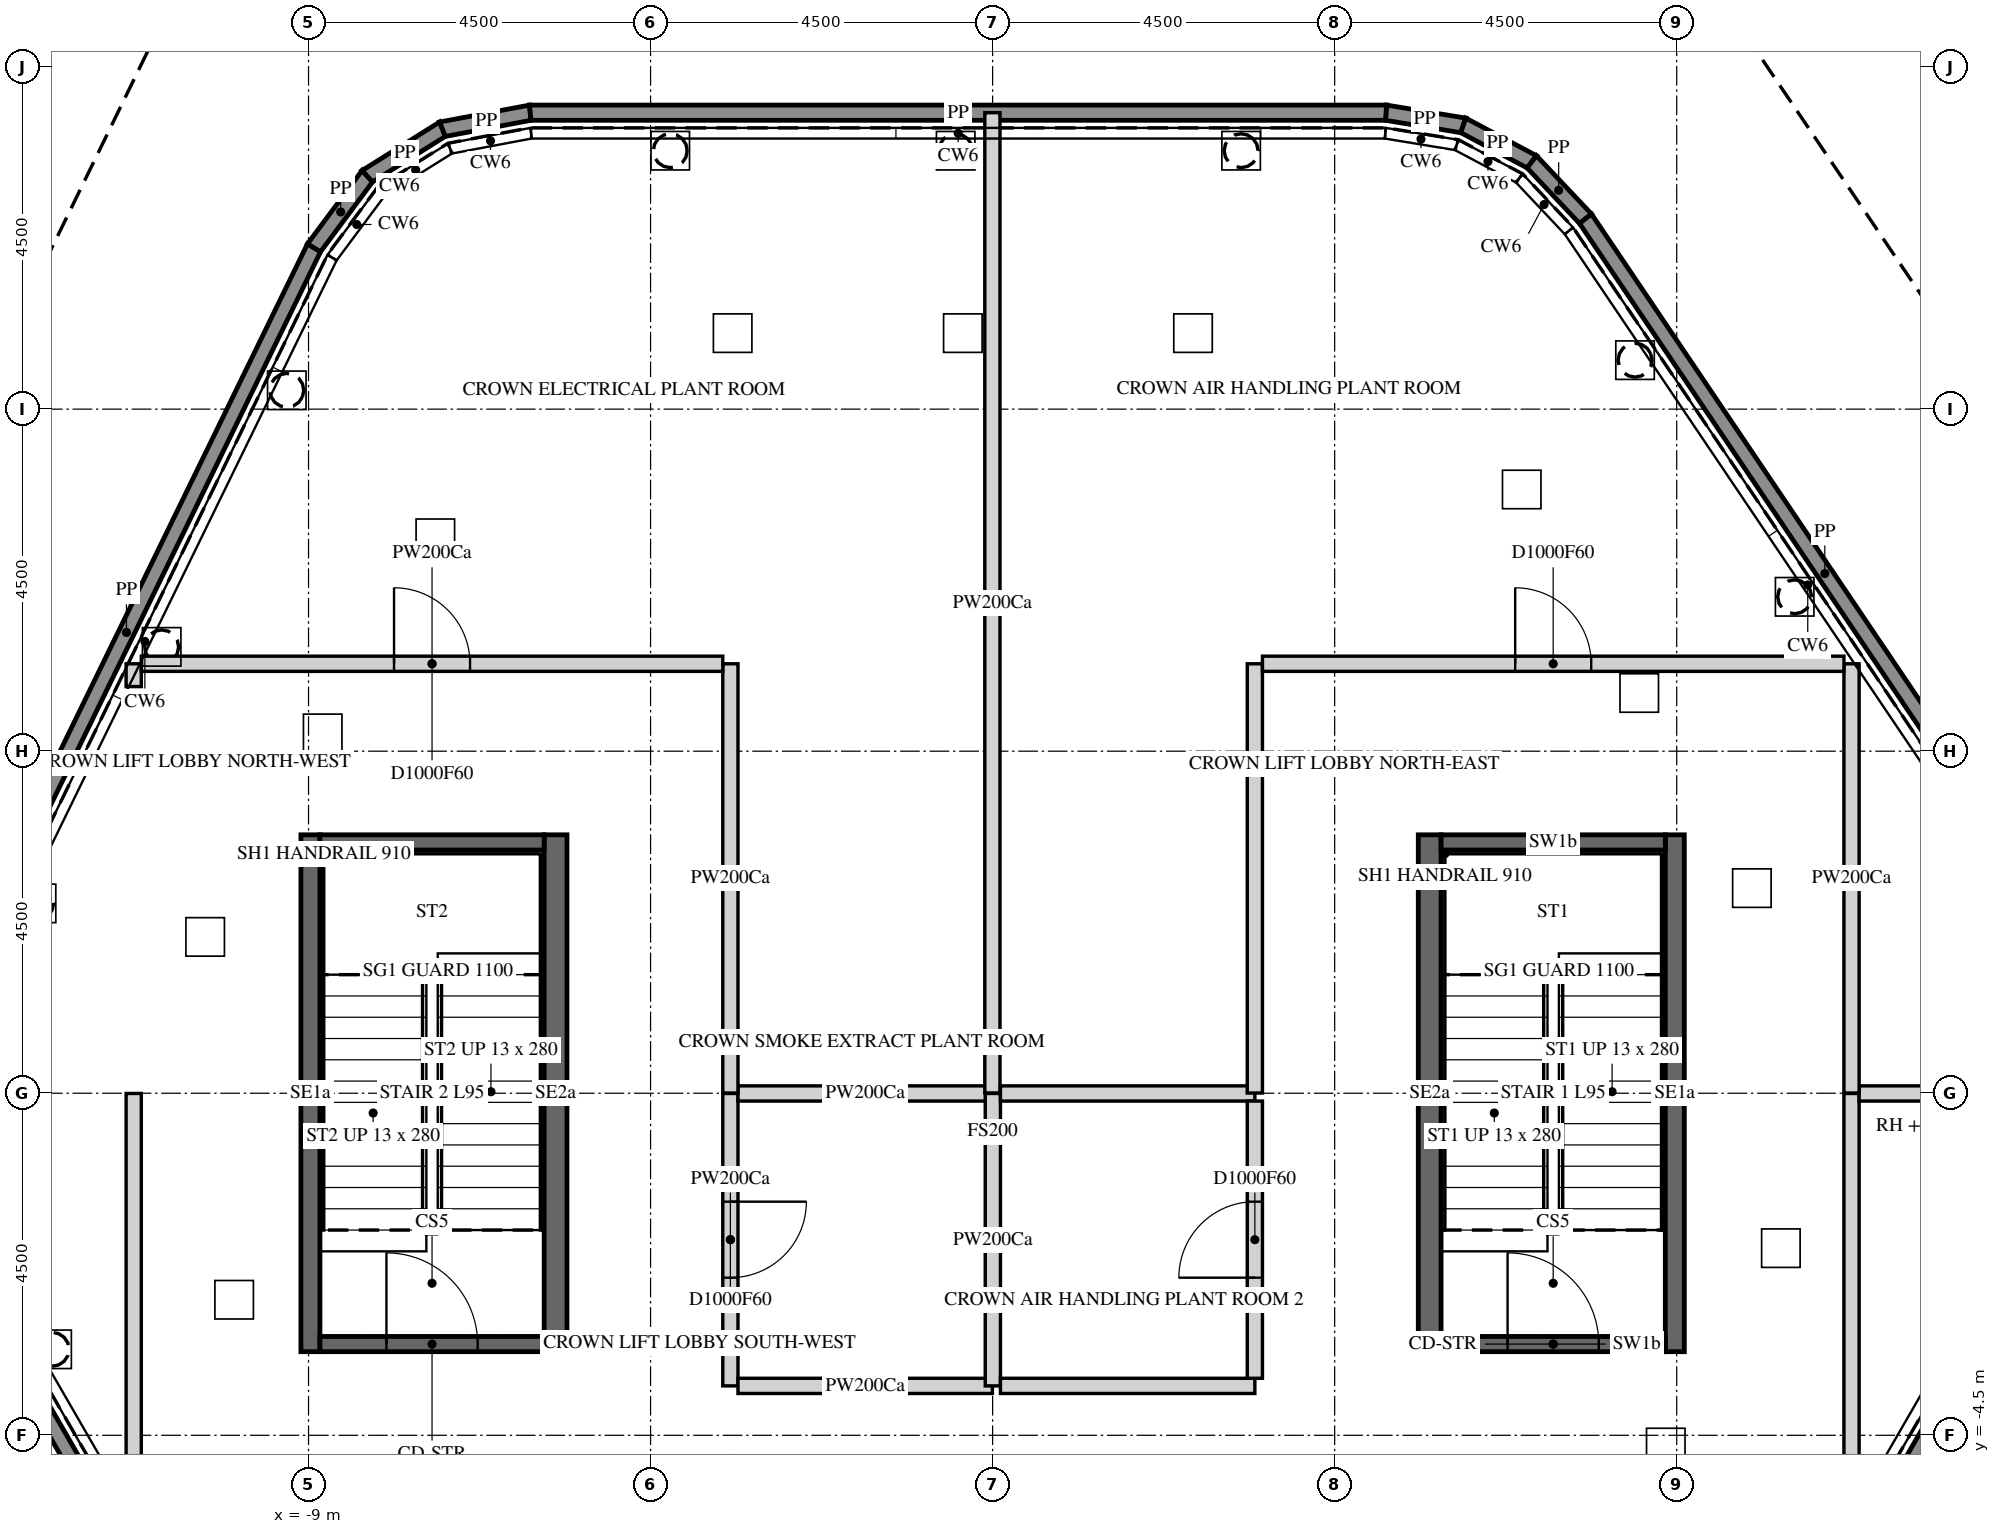
"""IFC4 building model, lengths in metres.
Left out: names, types, materials, properties, quantities, classifications, styles, units other than length and angle.
Written with IfcOpenShell. Run it as: python <this file> out.ifc"""

import sys

from ifc_helpers import new_model, si_unit, direction, frame, frame_2d, origin, place, context, subcontext, project, spatial, polyline, rectangle, outline, extrude, element, fill, save


model = new_model("IFC4")
c1 = context("Model", 3, precision=1e-05, world=origin(), true_north=direction((0.0, 1.0)))
c2 = subcontext(c1, "Body", "Model", "MODEL_VIEW")
j1 = project(units=[si_unit("LENGTHUNIT", "METRE"), si_unit("PLANEANGLEUNIT", "RADIAN")], contexts=[c1])
p1 = place(None, origin())
s1 = spatial("IfcSite", under=j1, at=p1, CompositionType="ELEMENT")
p2 = place(p1, origin())
s2 = spatial("IfcBuilding", under=s1, at=p2, CompositionType="ELEMENT")
p3 = place(p2, frame((0.0, 0.0, 401.7)))
s3 = spatial("IfcBuildingStorey", under=s2, at=p3, CompositionType="ELEMENT", Elevation=401.7)
p4 = place(p3, frame((5.176, 12.9, 4.5), z_axis=(0.0, 0.0, 1.0), x_axis=(0.986756818481, -0.162206600298, 0.0)))
e1 = element("IfcWall", 1, at=p4, inside=s3, PredefinedType="PARAPET", context=c2, shape_type="SweptSolid", body=[
    extrude(outline(polyline([(0.008, -0.1), (1.013, -0.1), (1.046, 0.1), (-0.008, 0.1), (0.008, -0.1)])), origin(), (0.0, 0.0, 1.0), 1.1),
])
p5 = place(p3, frame((6.192, 12.733, 4.5), z_axis=(0.0, 0.0, 1.0), x_axis=(0.883060001067, -0.469260092608, 0.0)))
e2 = element("IfcWall", 2, at=p5, inside=s3, PredefinedType="PARAPET", context=c2, shape_type="SweptSolid", body=[
    extrude(outline(polyline([(0.016, -0.1), (1.005, -0.1), (1.038, 0.1), (-0.016, 0.1), (0.016, -0.1)])), origin(), (0.0, 0.0, 1.0), 1.1),
])
p6 = place(p3, frame((7.094, 12.254, 4.5), z_axis=(0.0, 0.0, 1.0), x_axis=(0.686177819421, -0.727433845882, 0.0)))
e3 = element("IfcWall", 3, at=p6, inside=s3, PredefinedType="PARAPET", context=c2, shape_type="SweptSolid", body=[
    extrude(outline(polyline([(0.016, -0.1), (1.022, -0.1), (1.038, 0.1), (-0.016, 0.1), (0.016, -0.1)])), origin(), (0.0, 0.0, 1.0), 1.1),
])
p7 = place(p3, frame((7.8, 11.505, 4.5), z_axis=(0.0, 0.0, 1.0), x_axis=(0.559185688325, -0.829042439186, 0.0)))
e4 = element("IfcWall", 4, at=p7, inside=s3, PredefinedType="PARAPET", context=c2, shape_type="SweptSolid", body=[
    extrude(outline(polyline([(0.008, -0.1), (11.25, -0.1), (11.268, 0.1), (-0.008, 0.1), (0.008, -0.1)])), origin(), (0.0, 0.0, 1.0), 1.1),
])
for number, where, z_axis, x_axis in (
    (5, (14.213, -1.182, 4.5), (0.0, 0.0, 1.0), (-0.5, -0.866, 0.0)),
    (6, (-8.13, -11.718, 4.5), (0.0, 0.0, 1.0), (-0.5, 0.866, 0.0)),
):
    element("IfcWall", number, at=place(p3, frame(where, z_axis=z_axis, x_axis=x_axis)), inside=s3, PredefinedType="PARAPET", context=c2, shape_type="SweptSolid", body=[
        extrude(outline(polyline([(0.009, -0.1), (11.251, -0.1), (11.267, 0.1), (-0.009, 0.1), (0.009, -0.1)])), origin(), (0.0, 0.0, 1.0), 1.1),
    ])
p8 = place(p3, frame((-13.864, 1.003, 4.5), z_axis=(0.0, 0.0, 1.0), x_axis=(0.438379628459, 0.898789909463, 0.0)))
e7 = element("IfcWall", 7, at=p8, inside=s3, PredefinedType="PARAPET", context=c2, shape_type="SweptSolid", body=[
    extrude(outline(polyline([(0.008, -0.1), (11.25, -0.1), (11.269, 0.1), (-0.008, 0.1), (0.008, -0.1)])), origin(), (0.0, 0.0, 1.0), 1.1),
])
p9 = place(p3, frame((-8.928, 11.123, 4.5), z_axis=(0.0, 0.0, 1.0), x_axis=(0.597203575661, 0.802089701479, 0.0)))
e8 = element("IfcWall", 8, at=p9, inside=s3, PredefinedType="PARAPET", context=c2, shape_type="SweptSolid", body=[
    extrude(outline(polyline([(0.009, -0.1), (1.156, -0.1), (1.194, 0.1), (-0.009, 0.1), (0.009, -0.1)])), origin(), (0.0, 0.0, 1.0), 1.1),
])
p10 = place(p3, frame((-8.226, 12.065, 4.5), z_axis=(0.0, 0.0, 1.0), x_axis=(0.847998304005, 0.529998940003, 0.0)))
e9 = element("IfcWall", 9, at=p10, inside=s3, PredefinedType="PARAPET", context=c2, shape_type="SweptSolid", body=[
    extrude(outline(polyline([(0.019, -0.1), (1.147, -0.1), (1.184, 0.1), (-0.019, 0.1), (0.019, -0.1)])), origin(), (0.0, 0.0, 1.0), 1.1),
])
p11 = place(p3, frame((-7.238, 12.683, 4.5), z_axis=(0.0, 0.0, 1.0), x_axis=(0.982747274219, 0.184953494196, 0.0)))
e10 = element("IfcWall", 10, at=p11, inside=s3, PredefinedType="PARAPET", context=c2, shape_type="SweptSolid", body=[
    extrude(outline(polyline([(0.019, -0.1), (1.166, -0.1), (1.184, 0.1), (-0.019, 0.1), (0.019, -0.1)])), origin(), (0.0, 0.0, 1.0), 1.1),
])
p12 = place(p3, frame((-6.083, 12.9, 4.5), z_axis=(0.0, 0.0, 1.0), x_axis=(1.0, 0.0, 0.0)))
e11 = element("IfcWall", 11, at=p12, inside=s3, PredefinedType="PARAPET", context=c2, shape_type="SweptSolid", body=[
    extrude(outline(polyline([(0.009, -0.1), (11.251, -0.1), (11.267, 0.1), (-0.009, 0.1), (0.009, -0.1)])), origin(), (0.0, 0.0, 1.0), 1.1),
])
p13 = place(p3, frame((5.75, -3.4, -0.2), z_axis=(0.0, 0.0, 1.0), x_axis=(0.0, 1.0, 0.0)))
e12 = element("IfcWall", 12, at=p13, inside=s3, PredefinedType="SHEAR", context=c2, shape_type="SweptSolid", body=[
    extrude(rectangle(XDim=6.8, YDim=0.3, at=frame_2d((3.4, 0.0))), origin(), (0.0, 0.0, 1.0), 4.5),
])
p14 = place(p3, frame((8.975, -3.4, -0.2), z_axis=(0.0, 0.0, 1.0), x_axis=(0.0, 1.0, 0.0)))
e13 = element("IfcWall", 13, at=p14, inside=s3, PredefinedType="SHEAR", context=c2, shape_type="SweptSolid", body=[
    extrude(rectangle(XDim=6.8, YDim=0.25, at=frame_2d((3.4, 0.0))), origin(), (0.0, 0.0, 1.0), 4.5),
])
p15 = place(p3, frame((5.9, 3.3, -0.2), z_axis=(0.0, 0.0, 1.0), x_axis=(1.0, 0.0, 0.0)))
e14 = element("IfcWall", 14, at=p15, inside=s3, PredefinedType="SHEAR", context=c2, shape_type="SweptSolid", body=[
    extrude(rectangle(XDim=2.95, YDim=0.2, at=frame_2d((1.475, 0.0))), origin(), (0.0, 0.0, 1.0), 4.5),
])
p16 = place(p3, frame((5.9, -3.3, -0.2), z_axis=(0.0, 0.0, 1.0), x_axis=(1.0, 0.0, 0.0)))
e15 = element("IfcWall", 15, at=p16, inside=s3, PredefinedType="SHEAR", context=c2, shape_type="SweptSolid", body=[
    extrude(rectangle(XDim=2.95, YDim=0.2, at=frame_2d((1.475, 0.0))), origin(), (0.0, 0.0, 1.0), 4.5),
])
p17 = place(p16, frame((0.875, 0.0, 0.2)))
e16 = element("IfcOpeningElement", 16, at=p17, cuts=e15, PredefinedType="OPENING", context=c2, shape_type="SweptSolid", body=[
    extrude(rectangle(XDim=1.2, YDim=2.4, at=frame_2d((0.6, 1.2))), frame((0.0, 0.11, 0.0), z_axis=(0.0, -1.0, 0.0), x_axis=(1.0, 0.0, 0.0)), (0.0, 0.0, 1.0), 0.22),
])
p18 = place(p3, frame((-5.75, -3.4, -0.2), z_axis=(0.0, 0.0, 1.0), x_axis=(0.0, 1.0, 0.0)))
e17 = element("IfcWall", 17, at=p18, inside=s3, PredefinedType="SHEAR", context=c2, shape_type="SweptSolid", body=[
    extrude(rectangle(XDim=6.8, YDim=0.3, at=frame_2d((3.4, 0.0))), origin(), (0.0, 0.0, 1.0), 4.5),
])
p19 = place(p3, frame((-8.975, -3.4, -0.2), z_axis=(0.0, 0.0, 1.0), x_axis=(0.0, 1.0, 0.0)))
e18 = element("IfcWall", 18, at=p19, inside=s3, PredefinedType="SHEAR", context=c2, shape_type="SweptSolid", body=[
    extrude(rectangle(XDim=6.8, YDim=0.25, at=frame_2d((3.4, 0.0))), origin(), (0.0, 0.0, 1.0), 4.5),
])
p20 = place(p3, frame((-8.85, 3.3, -0.2), z_axis=(0.0, 0.0, 1.0), x_axis=(1.0, 0.0, 0.0)))
e19 = element("IfcWall", 19, at=p20, inside=s3, PredefinedType="SHEAR", context=c2, shape_type="SweptSolid", body=[
    extrude(rectangle(XDim=2.95, YDim=0.2, at=frame_2d((1.475, 0.0))), origin(), (0.0, 0.0, 1.0), 4.5),
])
p21 = place(p3, frame((-8.85, -3.3, -0.2), z_axis=(0.0, 0.0, 1.0), x_axis=(1.0, 0.0, 0.0)))
e20 = element("IfcWall", 20, at=p21, inside=s3, PredefinedType="SHEAR", context=c2, shape_type="SweptSolid", body=[
    extrude(rectangle(XDim=2.95, YDim=0.2, at=frame_2d((1.475, 0.0))), origin(), (0.0, 0.0, 1.0), 4.5),
])
p22 = place(p21, frame((0.875, 0.0, 0.2)))
e21 = element("IfcOpeningElement", 21, at=p22, cuts=e20, PredefinedType="OPENING", context=c2, shape_type="SweptSolid", body=[
    extrude(rectangle(XDim=1.2, YDim=2.4, at=frame_2d((0.6, 1.2))), frame((0.0, 0.11, 0.0), z_axis=(0.0, -1.0, 0.0), x_axis=(1.0, 0.0, 0.0)), (0.0, 0.0, 1.0), 0.22),
])
p23 = place(p3, frame((-11.3, -0.003, 0.0), z_axis=(0.0, 0.0, 1.0), x_axis=(0.0, -1.0, 0.0)))
e22 = element("IfcWall", 22, at=p23, inside=s3, PredefinedType="PARTITIONING", context=c2, shape_type="SweptSolid", body=[
    extrude(rectangle(XDim=5.547, YDim=0.2, at=frame_2d((2.773, 0.0))), origin(), (0.0, 0.0, 1.0), 4.3),
])
p24 = place(p3, frame((-11.3, 5.65, 0.0), z_axis=(0.0, 0.0, 1.0), x_axis=(0.0, -1.0, 0.0)))
e23 = element("IfcWall", 23, at=p24, inside=s3, PredefinedType="PARTITIONING", context=c2, shape_type="SweptSolid", body=[
    extrude(rectangle(XDim=0.3, YDim=0.2, at=frame_2d((0.15, 0.0))), origin(), (0.0, 0.0, 1.0), 4.3),
])
p25 = place(p3, frame((-3.45, -0.003, 0.0), z_axis=(0.0, 0.0, 1.0), x_axis=(0.0, -1.0, 0.0)))
e24 = element("IfcWall", 24, at=p25, inside=s3, PredefinedType="PARTITIONING", context=c2, shape_type="SweptSolid", body=[
    extrude(rectangle(XDim=3.847, YDim=0.2, at=frame_2d((1.924, 0.0))), origin(), (0.0, 0.0, 1.0), 4.3),
])
p26 = place(p25, frame((1.424, 0.0, 0.0)))
e25 = element("IfcOpeningElement", 25, at=p26, cuts=e24, PredefinedType="OPENING", context=c2, shape_type="SweptSolid", body=[
    extrude(rectangle(XDim=1.0, YDim=2.1, at=frame_2d((0.5, 1.05))), frame((0.0, 0.11, 0.0), z_axis=(0.0, -1.0, 0.0), x_axis=(1.0, 0.0, 0.0)), (0.0, 0.0, 1.0), 0.22),
])
p27 = place(p3, frame((-3.35, -0.003, 0.0), z_axis=(0.0, 0.0, 1.0), x_axis=(1.0, 0.0, 0.0)))
e26 = element("IfcWall", 26, at=p27, inside=s3, PredefinedType="PARTITIONING", context=c2, shape_type="SweptSolid", body=[
    extrude(rectangle(XDim=3.347, YDim=0.2, at=frame_2d((1.674, 0.0))), origin(), (0.0, 0.0, 1.0), 4.3),
])
p28 = place(p3, frame((-3.45, 0.003, 0.0), z_axis=(0.0, 0.0, 1.0), x_axis=(0.0, 1.0, 0.0)))
e27 = element("IfcWall", 27, at=p28, inside=s3, PredefinedType="PARTITIONING", context=c2, shape_type="SweptSolid", body=[
    extrude(rectangle(XDim=5.647, YDim=0.2, at=frame_2d((2.823, 0.0))), origin(), (0.0, 0.0, 1.0), 4.3),
])
p29 = place(p3, frame((-11.2, 5.65, 0.0), z_axis=(0.0, 0.0, 1.0), x_axis=(1.0, 0.0, 0.0)))
e28 = element("IfcWall", 28, at=p29, inside=s3, PredefinedType="PARTITIONING", context=c2, shape_type="SweptSolid", body=[
    extrude(rectangle(XDim=7.65, YDim=0.2, at=frame_2d((3.825, 0.0))), origin(), (0.0, 0.0, 1.0), 4.3),
])
p30 = place(p29, frame((3.325, 0.0, 0.0)))
e29 = element("IfcOpeningElement", 29, at=p30, cuts=e28, PredefinedType="OPENING", context=c2, shape_type="SweptSolid", body=[
    extrude(rectangle(XDim=1.0, YDim=2.1, at=frame_2d((0.5, 1.05))), frame((0.0, 0.11, 0.0), z_axis=(0.0, -1.0, 0.0), x_axis=(1.0, 0.0, 0.0)), (0.0, 0.0, 1.0), 0.22),
])
p31 = place(p3, frame((-0.003, -3.85, 0.0), z_axis=(0.0, 0.0, 1.0), x_axis=(-1.0, 0.0, 0.0)))
e30 = element("IfcWall", 30, at=p31, inside=s3, PredefinedType="PARTITIONING", context=c2, shape_type="SweptSolid", body=[
    extrude(rectangle(XDim=3.347, YDim=0.2, at=frame_2d((1.674, 0.0))), origin(), (0.0, 0.0, 1.0), 4.3),
])
p32 = place(p3, frame((-0.003, 12.9, 0.0), z_axis=(0.0, 0.0, 1.0), x_axis=(0.0, -1.0, 0.0)))
e31 = element("IfcWall", 31, at=p32, inside=s3, PredefinedType="PARTITIONING", context=c2, shape_type="SweptSolid", body=[
    extrude(rectangle(XDim=12.897, YDim=0.2, at=frame_2d((6.448, 0.0))), origin(), (0.0, 0.0, 1.0), 4.3),
])
p33 = place(p3, frame((0.003, -3.85, 0.0), z_axis=(0.0, 0.0, 1.0), x_axis=(0.0, 1.0, 0.0)))
e32 = element("IfcWall", 32, at=p33, inside=s3, PredefinedType="PARTITIONING", context=c2, shape_type="SweptSolid", body=[
    extrude(rectangle(XDim=3.847, YDim=0.2, at=frame_2d((1.924, 0.0))), origin(), (0.0, 0.0, 1.0), 4.3),
])
for number, where, z_axis, x_axis in (
    (33, (0.103, -0.003, 0.0), (0.0, 0.0, 1.0), (1.0, 0.0, 0.0)),
    (34, (3.45, -3.85, 0.0), (0.0, 0.0, 1.0), (-1.0, 0.0, 0.0)),
):
    element("IfcWall", number, at=place(p3, frame(where, z_axis=z_axis, x_axis=x_axis)), inside=s3, PredefinedType="PARTITIONING", context=c2, shape_type="SweptSolid", body=[
        extrude(rectangle(XDim=3.347, YDim=0.2, at=frame_2d((1.673, 0.0))), origin(), (0.0, 0.0, 1.0), 4.3),
    ])
p34 = place(p3, frame((3.45, -3.75, 0.0), z_axis=(0.0, 0.0, 1.0), x_axis=(0.0, 1.0, 0.0)))
e35 = element("IfcWall", 35, at=p34, inside=s3, PredefinedType="PARTITIONING", context=c2, shape_type="SweptSolid", body=[
    extrude(rectangle(XDim=3.647, YDim=0.2, at=frame_2d((1.823, 0.0))), origin(), (0.0, 0.0, 1.0), 4.3),
])
p35 = place(p34, frame((1.323, 0.0, 0.0)))
e36 = element("IfcOpeningElement", 36, at=p35, cuts=e35, PredefinedType="OPENING", context=c2, shape_type="SweptSolid", body=[
    extrude(rectangle(XDim=1.0, YDim=2.1, at=frame_2d((0.5, 1.05))), frame((0.0, 0.11, 0.0), z_axis=(0.0, -1.0, 0.0), x_axis=(1.0, 0.0, 0.0)), (0.0, 0.0, 1.0), 0.22),
])
p36 = place(p3, frame((3.45, 5.65, 0.0), z_axis=(0.0, 0.0, 1.0), x_axis=(0.0, -1.0, 0.0)))
e37 = element("IfcWall", 37, at=p36, inside=s3, PredefinedType="PARTITIONING", context=c2, shape_type="SweptSolid", body=[
    extrude(rectangle(XDim=5.647, YDim=0.2, at=frame_2d((2.823, 0.0))), origin(), (0.0, 0.0, 1.0), 4.3),
])
p37 = place(p3, frame((11.3, -5.55, 0.0), z_axis=(0.0, 0.0, 1.0), x_axis=(0.0, 1.0, 0.0)))
e38 = element("IfcWall", 38, at=p37, inside=s3, PredefinedType="PARTITIONING", context=c2, shape_type="SweptSolid", body=[
    extrude(rectangle(XDim=5.547, YDim=0.2, at=frame_2d((2.773, 0.0))), origin(), (0.0, 0.0, 1.0), 4.3),
])
p38 = place(p3, frame((11.4, -0.003, 0.0), z_axis=(0.0, 0.0, 1.0), x_axis=(1.0, 0.0, 0.0)))
e39 = element("IfcWall", 39, at=p38, inside=s3, PredefinedType="PARTITIONING", context=c2, shape_type="SweptSolid", body=[
    extrude(rectangle(XDim=3.203, YDim=0.2, at=frame_2d((1.602, 0.0))), origin(), (0.0, 0.0, 1.0), 4.3),
])
p39 = place(p3, frame((11.3, 0.003, 0.0), z_axis=(0.0, 0.0, 1.0), x_axis=(0.0, 1.0, 0.0)))
e40 = element("IfcWall", 40, at=p39, inside=s3, PredefinedType="PARTITIONING", context=c2, shape_type="SweptSolid", body=[
    extrude(rectangle(XDim=5.647, YDim=0.2, at=frame_2d((2.823, 0.0))), origin(), (0.0, 0.0, 1.0), 4.3),
])
p40 = place(p3, frame((3.55, 5.65, 0.0), z_axis=(0.0, 0.0, 1.0), x_axis=(1.0, 0.0, 0.0)))
e41 = element("IfcWall", 41, at=p40, inside=s3, PredefinedType="PARTITIONING", context=c2, shape_type="SweptSolid", body=[
    extrude(rectangle(XDim=7.65, YDim=0.2, at=frame_2d((3.825, 0.0))), origin(), (0.0, 0.0, 1.0), 4.3),
])
p41 = place(p40, frame((3.325, 0.0, 0.0)))
e42 = element("IfcOpeningElement", 42, at=p41, cuts=e41, PredefinedType="OPENING", context=c2, shape_type="SweptSolid", body=[
    extrude(rectangle(XDim=1.0, YDim=2.1, at=frame_2d((0.5, 1.05))), frame((0.0, 0.11, 0.0), z_axis=(0.0, -1.0, 0.0), x_axis=(1.0, 0.0, 0.0)), (0.0, 0.0, 1.0), 0.22),
])
p42 = place(p17, origin())
e43 = element("IfcDoor", 43, at=p42, inside=s3, OperationType="SINGLE_SWING_LEFT", PredefinedType="DOOR", context=c2, shape_type="SweptSolid", body=[
    extrude(rectangle(XDim=1.2, YDim=2.4, at=frame_2d((0.6, 1.2))), frame((0.0, 0.025, 0.0), z_axis=(0.0, -1.0, 0.0), x_axis=(1.0, 0.0, 0.0)), (0.0, 0.0, 1.0), 0.05),
])
fill(e16, e43)
p43 = place(p22, origin())
e44 = element("IfcDoor", 44, at=p43, inside=s3, OperationType="SINGLE_SWING_LEFT", PredefinedType="DOOR", context=c2, shape_type="SweptSolid", body=[
    extrude(rectangle(XDim=1.2, YDim=2.4, at=frame_2d((0.6, 1.2))), frame((0.0, 0.025, 0.0), z_axis=(0.0, -1.0, 0.0), x_axis=(1.0, 0.0, 0.0)), (0.0, 0.0, 1.0), 0.05),
])
fill(e21, e44)
p44 = place(p26, origin())
e45 = element("IfcDoor", 45, at=p44, inside=s3, OperationType="SINGLE_SWING_LEFT", PredefinedType="DOOR", context=c2, shape_type="SweptSolid", body=[
    extrude(rectangle(XDim=1.0, YDim=2.1, at=frame_2d((0.5, 1.05))), frame((0.0, 0.025, 0.0), z_axis=(0.0, -1.0, 0.0), x_axis=(1.0, 0.0, 0.0)), (0.0, 0.0, 1.0), 0.05),
])
fill(e25, e45)
p45 = place(p30, origin())
e46 = element("IfcDoor", 46, at=p45, inside=s3, OperationType="SINGLE_SWING_RIGHT", PredefinedType="DOOR", context=c2, shape_type="SweptSolid", body=[
    extrude(rectangle(XDim=1.0, YDim=2.1, at=frame_2d((0.5, 1.05))), frame((0.0, 0.025, 0.0), z_axis=(0.0, -1.0, 0.0), x_axis=(1.0, 0.0, 0.0)), (0.0, 0.0, 1.0), 0.05),
])
fill(e29, e46)
p46 = place(p35, origin())
e47 = element("IfcDoor", 47, at=p46, inside=s3, OperationType="SINGLE_SWING_LEFT", PredefinedType="DOOR", context=c2, shape_type="SweptSolid", body=[
    extrude(rectangle(XDim=1.0, YDim=2.1, at=frame_2d((0.5, 1.05))), frame((0.0, 0.025, 0.0), z_axis=(0.0, -1.0, 0.0), x_axis=(1.0, 0.0, 0.0)), (0.0, 0.0, 1.0), 0.05),
])
fill(e36, e47)
p47 = place(p41, origin())
e48 = element("IfcDoor", 48, at=p47, inside=s3, OperationType="SINGLE_SWING_LEFT", PredefinedType="DOOR", context=c2, shape_type="SweptSolid", body=[
    extrude(rectangle(XDim=1.0, YDim=2.1, at=frame_2d((0.5, 1.05))), frame((0.0, 0.025, 0.0), z_axis=(0.0, -1.0, 0.0), x_axis=(1.0, 0.0, 0.0)), (0.0, 0.0, 1.0), 0.05),
])
fill(e42, e48)
save(model, sys.argv[1])
